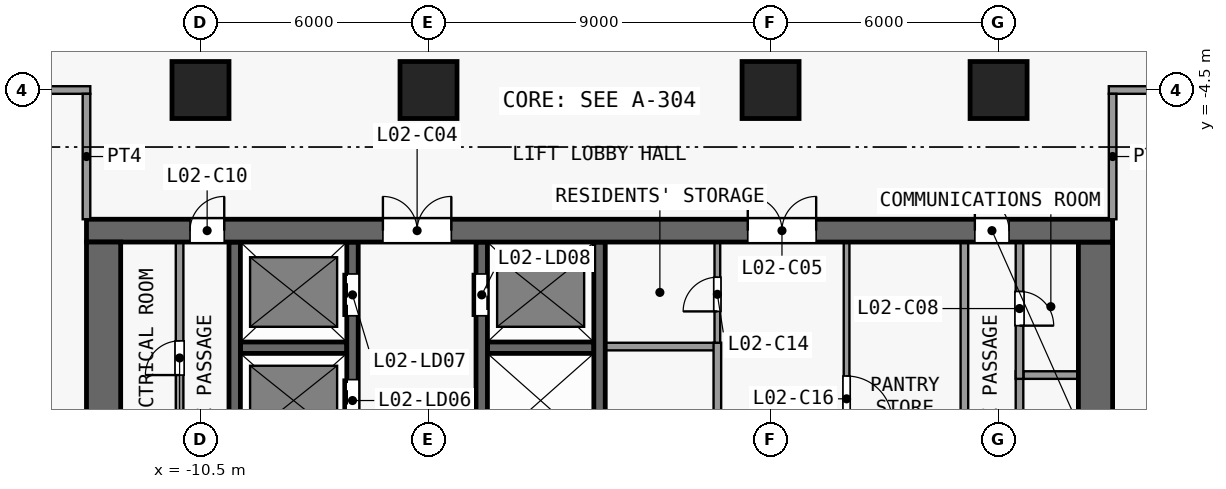
"""IFC4 building model, lengths in metres.
Left out: names, types, materials, properties, quantities, classifications, styles, units other than length and angle.
Written with IfcOpenShell. Run it as: python <this file> out.ifc"""

import sys

from ifc_helpers import new_model, si_unit, direction, frame, frame_2d, origin, origin_2d, place, context, subcontext, project, spatial, rectangle, extrude, element, fill, save


model = new_model("IFC4")
c1 = context("Model", 3, precision=1e-05, world=origin(), true_north=direction((0.0, 1.0)))
c2 = subcontext(c1, "Body", "Model", "MODEL_VIEW")
j1 = project(units=[si_unit("LENGTHUNIT", "METRE"), si_unit("PLANEANGLEUNIT", "RADIAN")], contexts=[c1])
p1 = place(None, origin())
s1 = spatial("IfcSite", under=j1, at=p1, CompositionType="ELEMENT")
p2 = place(p1, origin())
s2 = spatial("IfcBuilding", under=s1, at=p2, CompositionType="ELEMENT")
p3 = place(p2, frame((0.0, 0.0, 13.5)))
s3 = spatial("IfcBuildingStorey", under=s2, at=p3, CompositionType="ELEMENT", Elevation=13.5)
for number, where, z_axis, x_axis in (
    (1, (-10.5, -4.5, 0.0), (0.0, 0.0, 1.0), (1.0, 0.0, 0.0)),
    (2, (-4.5, -4.5, 0.0), (0.0, 0.0, 1.0), (1.0, 0.0, 0.0)),
    (3, (4.5, -4.5, 0.0), (0.0, 0.0, 1.0), (1.0, 0.0, 0.0)),
    (4, (10.5, -4.5, 0.0), (0.0, 0.0, 1.0), (1.0, 0.0, 0.0)),
):
    element("IfcColumn", number, at=place(p3, frame(where, z_axis=z_axis, x_axis=x_axis)), inside=s3, PredefinedType="COLUMN", context=c2, shape_type="SweptSolid", body=[
        extrude(rectangle(XDim=1.5, YDim=1.5, at=origin_2d()), origin(), (0.0, 0.0, 1.0), 5.0),
    ])
p4 = place(p3, frame((-13.5, -8.2, 0.0), z_axis=(0.0, 0.0, 1.0), x_axis=(1.0, 0.0, 0.0)))
e5 = element("IfcWall", 5, at=p4, inside=s3, PredefinedType="SHEAR", context=c2, shape_type="SweptSolid", body=[
    extrude(rectangle(XDim=27.0, YDim=0.6, at=frame_2d((13.5, 0.0))), origin(), (0.0, 0.0, 1.0), 4.65),
])
p5 = place(p4, frame((7.8, 0.0, 0.0)))
e6 = element("IfcOpeningElement", 6, at=p5, cuts=e5, PredefinedType="OPENING", context=c2, shape_type="SweptSolid", body=[
    extrude(rectangle(XDim=1.8, YDim=2.1, at=frame_2d((0.9, 1.05))), frame((0.0, 0.31, 0.0), z_axis=(0.0, -1.0, 0.0), x_axis=(1.0, 0.0, 0.0)), (0.0, 0.0, 1.0), 0.62),
])
p6 = place(p4, frame((17.4, 0.0, 0.0)))
e7 = element("IfcOpeningElement", 7, at=p6, cuts=e5, PredefinedType="OPENING", context=c2, shape_type="SweptSolid", body=[
    extrude(rectangle(XDim=1.8, YDim=2.1, at=frame_2d((0.9, 1.05))), frame((0.0, 0.31, 0.0), z_axis=(0.0, -1.0, 0.0), x_axis=(1.0, 0.0, 0.0)), (0.0, 0.0, 1.0), 0.62),
])
p7 = place(p4, frame((2.725, 0.0, 0.0)))
e8 = element("IfcOpeningElement", 8, at=p7, cuts=e5, PredefinedType="OPENING", context=c2, shape_type="SweptSolid", body=[
    extrude(rectangle(XDim=0.9, YDim=2.1, at=frame_2d((0.45, 1.05))), frame((0.0, 0.31, 0.0), z_axis=(0.0, -1.0, 0.0), x_axis=(1.0, 0.0, 0.0)), (0.0, 0.0, 1.0), 0.62),
])
p8 = place(p4, frame((23.375, 0.0, 0.0)))
e9 = element("IfcOpeningElement", 9, at=p8, cuts=e5, PredefinedType="OPENING", context=c2, shape_type="SweptSolid", body=[
    extrude(rectangle(XDim=0.9, YDim=2.1, at=frame_2d((0.45, 1.05))), frame((0.0, 0.31, 0.0), z_axis=(0.0, -1.0, 0.0), x_axis=(1.0, 0.0, 0.0)), (0.0, 0.0, 1.0), 0.62),
])
p9 = place(p3, frame((-13.05, -8.5, 0.0), z_axis=(0.0, 0.0, 1.0), x_axis=(0.0, -1.0, 0.0)))
e10 = element("IfcWall", 10, at=p9, inside=s3, PredefinedType="SHEAR", context=c2, shape_type="SweptSolid", body=[
    extrude(rectangle(XDim=16.1, YDim=0.9, at=frame_2d((8.05, 0.0))), origin(), (0.0, 0.0, 1.0), 4.65),
])
p10 = place(p9, frame((14.8, 0.0, 0.0)))
e11 = element("IfcOpeningElement", 11, at=p10, cuts=e10, PredefinedType="OPENING", context=c2, shape_type="SweptSolid", body=[
    extrude(rectangle(XDim=1.1, YDim=2.1, at=frame_2d((0.55, 1.05))), frame((0.0, 0.46, 0.0), z_axis=(0.0, -1.0, 0.0), x_axis=(1.0, 0.0, 0.0)), (0.0, 0.0, 1.0), 0.92),
])
p11 = place(p3, frame((13.05, -24.6, 0.0), z_axis=(0.0, 0.0, 1.0), x_axis=(0.0, 1.0, 0.0)))
e12 = element("IfcWall", 12, at=p11, inside=s3, PredefinedType="SHEAR", context=c2, shape_type="SweptSolid", body=[
    extrude(rectangle(XDim=16.1, YDim=0.9, at=frame_2d((8.05, 0.0))), origin(), (0.0, 0.0, 1.0), 4.65),
])
p12 = place(p11, frame((0.2, 0.0, 0.0)))
e13 = element("IfcOpeningElement", 13, at=p12, cuts=e12, PredefinedType="OPENING", context=c2, shape_type="SweptSolid", body=[
    extrude(rectangle(XDim=1.1, YDim=2.1, at=frame_2d((0.55, 1.05))), frame((0.0, 0.46, 0.0), z_axis=(0.0, -1.0, 0.0), x_axis=(1.0, 0.0, 0.0)), (0.0, 0.0, 1.0), 0.92),
])
p13 = place(p3, frame((11.15, -12.0, 0.0), z_axis=(0.0, 0.0, 1.0), x_axis=(1.0, 0.0, 0.0)))
e14 = element("IfcWall", 14, at=p13, inside=s3, PredefinedType="PARTITIONING", context=c2, shape_type="SweptSolid", body=[
    extrude(rectangle(XDim=1.45, YDim=0.2, at=frame_2d((0.725, 0.0))), origin(), (0.0, 0.0, 1.0), 4.65),
])
for number, where, z_axis, x_axis in (
    (15, (-9.45, -11.28, 0.0), (0.0, 0.0, 1.0), (1.0, 0.0, 0.0)),
    (16, (-2.95, -11.28, 0.0), (0.0, 0.0, 1.0), (1.0, 0.0, 0.0)),
):
    element("IfcWall", number, at=place(p3, frame(where, z_axis=z_axis, x_axis=x_axis)), inside=s3, PredefinedType="SHEAR", context=c2, shape_type="SweptSolid", body=[
        extrude(rectangle(XDim=2.8, YDim=0.3, at=frame_2d((1.4, 0.0))), origin(), (0.0, 0.0, 1.0), 4.65),
    ])
p14 = place(p3, frame((0.15, -11.25, 0.0), z_axis=(0.0, 0.0, 1.0), x_axis=(1.0, 0.0, 0.0)))
e17 = element("IfcWall", 17, at=p14, inside=s3, PredefinedType="PARTITIONING", context=c2, shape_type="SweptSolid", body=[
    extrude(rectangle(XDim=3.025, YDim=0.2, at=frame_2d((1.513, 0.0))), origin(), (0.0, 0.0, 1.0), 4.65),
])
p15 = place(p3, frame((-11.05, -14.7, 0.0), z_axis=(0.0, 0.0, 1.0), x_axis=(0.0, 1.0, 0.0)))
e18 = element("IfcWall", 18, at=p15, inside=s3, PredefinedType="PARTITIONING", context=c2, shape_type="SweptSolid", body=[
    extrude(rectangle(XDim=6.2, YDim=0.2, at=frame_2d((3.1, 0.0))), origin(), (0.0, 0.0, 1.0), 4.65),
])
p16 = place(p15, frame((2.7, 0.0, 0.0)))
e19 = element("IfcOpeningElement", 19, at=p16, cuts=e18, PredefinedType="OPENING", context=c2, shape_type="SweptSolid", body=[
    extrude(rectangle(XDim=0.9, YDim=2.1, at=frame_2d((0.45, 1.05))), frame((0.0, 0.11, 0.0), z_axis=(0.0, -1.0, 0.0), x_axis=(1.0, 0.0, 0.0)), (0.0, 0.0, 1.0), 0.22),
])
p17 = place(p3, frame((-9.6, -17.2, 0.0), z_axis=(0.0, 0.0, 1.0), x_axis=(0.0, 1.0, 0.0)))
e20 = element("IfcWall", 20, at=p17, inside=s3, PredefinedType="SHEAR", context=c2, shape_type="SweptSolid", body=[
    extrude(rectangle(XDim=8.7, YDim=0.3, at=frame_2d((4.35, 0.0))), origin(), (0.0, 0.0, 1.0), 4.65),
])
p18 = place(p3, frame((-6.5, -22.5, 0.0), z_axis=(0.0, 0.0, 1.0), x_axis=(0.0, 1.0, 0.0)))
e21 = element("IfcWall", 21, at=p18, inside=s3, PredefinedType="SHEAR", context=c2, shape_type="SweptSolid", body=[
    extrude(rectangle(XDim=14.0, YDim=0.3, at=frame_2d((7.0, 0.0))), origin(), (0.0, 0.0, 1.0), 4.65),
])
p19 = place(p18, frame((0.94, 0.0, 0.0)))
e22 = element("IfcOpeningElement", 22, at=p19, cuts=e21, PredefinedType="OPENING", context=c2, shape_type="SweptSolid", body=[
    extrude(rectangle(XDim=1.1, YDim=2.1, at=frame_2d((0.55, 1.05))), frame((0.0, 0.16, 0.0), z_axis=(0.0, -1.0, 0.0), x_axis=(1.0, 0.0, 0.0)), (0.0, 0.0, 1.0), 0.32),
])
p20 = place(p18, frame((3.72, 0.0, 0.0)))
e23 = element("IfcOpeningElement", 23, at=p20, cuts=e21, PredefinedType="OPENING", context=c2, shape_type="SweptSolid", body=[
    extrude(rectangle(XDim=1.1, YDim=2.1, at=frame_2d((0.55, 1.05))), frame((0.0, 0.16, 0.0), z_axis=(0.0, -1.0, 0.0), x_axis=(1.0, 0.0, 0.0)), (0.0, 0.0, 1.0), 0.32),
])
p21 = place(p18, frame((6.5, 0.0, 0.0)))
e24 = element("IfcOpeningElement", 24, at=p21, cuts=e21, PredefinedType="OPENING", context=c2, shape_type="SweptSolid", body=[
    extrude(rectangle(XDim=1.1, YDim=2.1, at=frame_2d((0.55, 1.05))), frame((0.0, 0.16, 0.0), z_axis=(0.0, -1.0, 0.0), x_axis=(1.0, 0.0, 0.0)), (0.0, 0.0, 1.0), 0.32),
])
p22 = place(p18, frame((9.28, 0.0, 0.0)))
e25 = element("IfcOpeningElement", 25, at=p22, cuts=e21, PredefinedType="OPENING", context=c2, shape_type="SweptSolid", body=[
    extrude(rectangle(XDim=1.1, YDim=2.1, at=frame_2d((0.55, 1.05))), frame((0.0, 0.16, 0.0), z_axis=(0.0, -1.0, 0.0), x_axis=(1.0, 0.0, 0.0)), (0.0, 0.0, 1.0), 0.32),
])
p23 = place(p18, frame((12.06, 0.0, 0.0)))
e26 = element("IfcOpeningElement", 26, at=p23, cuts=e21, PredefinedType="OPENING", context=c2, shape_type="SweptSolid", body=[
    extrude(rectangle(XDim=1.1, YDim=2.1, at=frame_2d((0.55, 1.05))), frame((0.0, 0.16, 0.0), z_axis=(0.0, -1.0, 0.0), x_axis=(1.0, 0.0, 0.0)), (0.0, 0.0, 1.0), 0.32),
])
p24 = place(p3, frame((-3.1, -22.55, 0.0), z_axis=(0.0, 0.0, 1.0), x_axis=(0.0, 1.0, 0.0)))
e27 = element("IfcWall", 27, at=p24, inside=s3, PredefinedType="SHEAR", context=c2, shape_type="SweptSolid", body=[
    extrude(rectangle(XDim=14.05, YDim=0.3, at=frame_2d((7.025, 0.0))), origin(), (0.0, 0.0, 1.0), 4.65),
])
p25 = place(p24, frame((12.11, 0.0, 0.0)))
e28 = element("IfcOpeningElement", 28, at=p25, cuts=e27, PredefinedType="OPENING", context=c2, shape_type="SweptSolid", body=[
    extrude(rectangle(XDim=1.1, YDim=2.1, at=frame_2d((0.55, 1.05))), frame((0.0, 0.16, 0.0), z_axis=(0.0, -1.0, 0.0), x_axis=(1.0, 0.0, 0.0)), (0.0, 0.0, 1.0), 0.32),
])
p26 = place(p24, frame((0.84, 0.0, 0.0)))
e29 = element("IfcOpeningElement", 29, at=p26, cuts=e27, PredefinedType="OPENING", context=c2, shape_type="SweptSolid", body=[
    extrude(rectangle(XDim=1.4, YDim=2.1, at=frame_2d((0.7, 1.05))), frame((0.0, 0.16, 0.0), z_axis=(0.0, -1.0, 0.0), x_axis=(1.0, 0.0, 0.0)), (0.0, 0.0, 1.0), 0.32),
])
p27 = place(p3, frame((0.0, -22.25, 0.0), z_axis=(0.0, 0.0, 1.0), x_axis=(0.0, 1.0, 0.0)))
e30 = element("IfcWall", 30, at=p27, inside=s3, PredefinedType="SHEAR", context=c2, shape_type="SweptSolid", body=[
    extrude(rectangle(XDim=13.75, YDim=0.3, at=frame_2d((6.875, 0.0))), origin(), (0.0, 0.0, 1.0), 4.65),
])
p28 = place(p3, frame((3.1, -19.6, 0.0), z_axis=(0.0, 0.0, 1.0), x_axis=(0.0, 1.0, 0.0)))
e31 = element("IfcWall", 31, at=p28, inside=s3, PredefinedType="PARTITIONING", context=c2, shape_type="SweptSolid", body=[
    extrude(rectangle(XDim=8.45, YDim=0.2, at=frame_2d((4.225, 0.0))), origin(), (0.0, 0.0, 1.0), 4.65),
])
p29 = place(p28, frame((3.625, 0.0, 0.0)))
e32 = element("IfcOpeningElement", 32, at=p29, cuts=e31, PredefinedType="OPENING", context=c2, shape_type="SweptSolid", body=[
    extrude(rectangle(XDim=1.2, YDim=2.1, at=frame_2d((0.6, 1.05))), frame((0.0, 0.11, 0.0), z_axis=(0.0, -1.0, 0.0), x_axis=(1.0, 0.0, 0.0)), (0.0, 0.0, 1.0), 0.22),
])
p30 = place(p3, frame((3.1, -11.15, 0.0), z_axis=(0.0, 0.0, 1.0), x_axis=(0.0, 1.0, 0.0)))
e33 = element("IfcWall", 33, at=p30, inside=s3, PredefinedType="PARTITIONING", context=c2, shape_type="SweptSolid", body=[
    extrude(rectangle(XDim=2.65, YDim=0.15, at=frame_2d((1.325, 0.0))), origin(), (0.0, 0.0, 1.0), 4.65),
])
p31 = place(p30, frame((0.825, 0.0, 0.0)))
e34 = element("IfcOpeningElement", 34, at=p31, cuts=e33, PredefinedType="OPENING", context=c2, shape_type="SweptSolid", body=[
    extrude(rectangle(XDim=0.9, YDim=2.1, at=frame_2d((0.45, 1.05))), frame((0.0, 0.085, 0.0), z_axis=(0.0, -1.0, 0.0), x_axis=(1.0, 0.0, 0.0)), (0.0, 0.0, 1.0), 0.17),
])
p32 = place(p3, frame((6.5, -8.5, 0.0), z_axis=(0.0, 0.0, 1.0), x_axis=(0.0, -1.0, 0.0)))
e35 = element("IfcWall", 35, at=p32, inside=s3, PredefinedType="PARTITIONING", context=c2, shape_type="SweptSolid", body=[
    extrude(rectangle(XDim=10.85, YDim=0.15, at=frame_2d((5.425, 0.0))), origin(), (0.0, 0.0, 1.0), 4.65),
])
p33 = place(p32, frame((9.175, 0.0, 0.0)))
e36 = element("IfcOpeningElement", 36, at=p33, cuts=e35, PredefinedType="OPENING", context=c2, shape_type="SweptSolid", body=[
    extrude(rectangle(XDim=0.9, YDim=2.1, at=frame_2d((0.45, 1.05))), frame((0.0, 0.085, 0.0), z_axis=(0.0, -1.0, 0.0), x_axis=(1.0, 0.0, 0.0)), (0.0, 0.0, 1.0), 0.17),
])
p34 = place(p32, frame((3.525, 0.0, 0.0)))
e37 = element("IfcOpeningElement", 37, at=p34, cuts=e35, PredefinedType="OPENING", context=c2, shape_type="SweptSolid", body=[
    extrude(rectangle(XDim=1.2, YDim=2.1, at=frame_2d((0.6, 1.05))), frame((0.0, 0.085, 0.0), z_axis=(0.0, -1.0, 0.0), x_axis=(1.0, 0.0, 0.0)), (0.0, 0.0, 1.0), 0.17),
])
p35 = place(p3, frame((9.6, -16.9, 0.0), z_axis=(0.0, 0.0, 1.0), x_axis=(0.0, 1.0, 0.0)))
e38 = element("IfcWall", 38, at=p35, inside=s3, PredefinedType="PARTITIONING", context=c2, shape_type="SweptSolid", body=[
    extrude(rectangle(XDim=8.4, YDim=0.2, at=frame_2d((4.2, 0.0))), origin(), (0.0, 0.0, 1.0), 4.65),
])
p36 = place(p3, frame((11.05, -11.9, 0.0), z_axis=(0.0, 0.0, 1.0), x_axis=(0.0, -1.0, 0.0)))
e39 = element("IfcWall", 39, at=p36, inside=s3, PredefinedType="PARTITIONING", context=c2, shape_type="SweptSolid", body=[
    extrude(rectangle(XDim=5.0, YDim=0.2, at=frame_2d((2.5, 0.0))), origin(), (0.0, 0.0, 1.0), 4.65),
])
p37 = place(p36, frame((2.175, 0.0, 0.0)))
e40 = element("IfcOpeningElement", 40, at=p37, cuts=e39, PredefinedType="OPENING", context=c2, shape_type="SweptSolid", body=[
    extrude(rectangle(XDim=0.9, YDim=2.1, at=frame_2d((0.45, 1.05))), frame((0.0, 0.11, 0.0), z_axis=(0.0, -1.0, 0.0), x_axis=(1.0, 0.0, 0.0)), (0.0, 0.0, 1.0), 0.22),
])
p38 = place(p3, frame((11.05, -8.5, 0.0), z_axis=(0.0, 0.0, 1.0), x_axis=(0.0, -1.0, 0.0)))
e41 = element("IfcWall", 41, at=p38, inside=s3, PredefinedType="PARTITIONING", context=c2, shape_type="SweptSolid", body=[
    extrude(rectangle(XDim=3.6, YDim=0.2, at=frame_2d((1.8, 0.0))), origin(), (0.0, 0.0, 1.0), 4.65),
])
p39 = place(p38, frame((1.3, 0.0, 0.0)))
e42 = element("IfcOpeningElement", 42, at=p39, cuts=e41, PredefinedType="OPENING", context=c2, shape_type="SweptSolid", body=[
    extrude(rectangle(XDim=0.9, YDim=2.1, at=frame_2d((0.45, 1.05))), frame((0.0, 0.11, 0.0), z_axis=(0.0, -1.0, 0.0), x_axis=(1.0, 0.0, 0.0)), (0.0, 0.0, 1.0), 0.22),
])
p40 = place(p3, frame((-31.6, -4.5, 0.0), z_axis=(0.0, 0.0, 1.0), x_axis=(1.0, 0.0, 0.0)))
e43 = element("IfcWall", 43, at=p40, inside=s3, PredefinedType="PARTITIONING", context=c2, shape_type="SweptSolid", body=[
    extrude(rectangle(XDim=18.2, YDim=0.2, at=frame_2d((9.1, 0.0))), origin(), (0.0, 0.0, 1.0), 4.65),
])
p41 = place(p40, frame((3.2, 0.0, 0.0)))
e44 = element("IfcOpeningElement", 44, at=p41, cuts=e43, PredefinedType="OPENING", context=c2, shape_type="SweptSolid", body=[
    extrude(rectangle(XDim=1.0, YDim=2.1, at=frame_2d((0.5, 1.05))), frame((0.0, 0.11, 0.0), z_axis=(0.0, -1.0, 0.0), x_axis=(1.0, 0.0, 0.0)), (0.0, 0.0, 1.0), 0.22),
])
p42 = place(p40, frame((13.2, 0.0, 0.0)))
e45 = element("IfcOpeningElement", 45, at=p42, cuts=e43, PredefinedType="OPENING", context=c2, shape_type="SweptSolid", body=[
    extrude(rectangle(XDim=1.0, YDim=2.1, at=frame_2d((0.5, 1.05))), frame((0.0, 0.11, 0.0), z_axis=(0.0, -1.0, 0.0), x_axis=(1.0, 0.0, 0.0)), (0.0, 0.0, 1.0), 0.22),
])
p43 = place(p3, frame((13.4, -4.5, 0.0), z_axis=(0.0, 0.0, 1.0), x_axis=(1.0, 0.0, 0.0)))
e46 = element("IfcWall", 46, at=p43, inside=s3, PredefinedType="PARTITIONING", context=c2, shape_type="SweptSolid", body=[
    extrude(rectangle(XDim=15.2, YDim=0.2, at=frame_2d((7.6, 0.0))), origin(), (0.0, 0.0, 1.0), 4.65),
])
p44 = place(p43, frame((7.1, 0.0, 0.0)))
e47 = element("IfcOpeningElement", 47, at=p44, cuts=e46, PredefinedType="OPENING", context=c2, shape_type="SweptSolid", body=[
    extrude(rectangle(XDim=1.0, YDim=2.1, at=frame_2d((0.5, 1.05))), frame((0.0, 0.11, 0.0), z_axis=(0.0, -1.0, 0.0), x_axis=(1.0, 0.0, 0.0)), (0.0, 0.0, 1.0), 0.22),
])
for number, where, z_axis, x_axis in (
    (48, (-13.5, -7.9, 0.0), (0.0, 0.0, 1.0), (0.0, 1.0, 0.0)),
    (49, (13.5, -7.9, 0.0), (0.0, 0.0, 1.0), (0.0, 1.0, 0.0)),
):
    element("IfcWall", number, at=place(p3, frame(where, z_axis=z_axis, x_axis=x_axis)), inside=s3, PredefinedType="PARTITIONING", context=c2, shape_type="SweptSolid", body=[
        extrude(rectangle(XDim=3.3, YDim=0.2, at=frame_2d((1.65, 0.0))), origin(), (0.0, 0.0, 1.0), 4.65),
    ])
p45 = place(p22, origin())
e50 = element("IfcDoor", 50, at=p45, inside=s3, OperationType="DOUBLE_DOOR_SLIDING", PredefinedType="DOOR", context=c2, shape_type="SweptSolid", body=[
    extrude(rectangle(XDim=1.1, YDim=2.1, at=frame_2d((0.55, 1.05))), frame((0.0, 0.025, 0.0), z_axis=(0.0, -1.0, 0.0), x_axis=(1.0, 0.0, 0.0)), (0.0, 0.0, 1.0), 0.05),
])
fill(e25, e50)
p46 = place(p23, origin())
e51 = element("IfcDoor", 51, at=p46, inside=s3, OperationType="DOUBLE_DOOR_SLIDING", PredefinedType="DOOR", context=c2, shape_type="SweptSolid", body=[
    extrude(rectangle(XDim=1.1, YDim=2.1, at=frame_2d((0.55, 1.05))), frame((0.0, 0.025, 0.0), z_axis=(0.0, -1.0, 0.0), x_axis=(1.0, 0.0, 0.0)), (0.0, 0.0, 1.0), 0.05),
])
fill(e26, e51)
p47 = place(p25, origin())
e52 = element("IfcDoor", 52, at=p47, inside=s3, OperationType="DOUBLE_DOOR_SLIDING", PredefinedType="DOOR", context=c2, shape_type="SweptSolid", body=[
    extrude(rectangle(XDim=1.1, YDim=2.1, at=frame_2d((0.55, 1.05))), frame((0.0, 0.025, 0.0), z_axis=(0.0, -1.0, 0.0), x_axis=(1.0, 0.0, 0.0)), (0.0, 0.0, 1.0), 0.05),
])
fill(e28, e52)
p48 = place(p5, origin())
e53 = element("IfcDoor", 53, at=p48, inside=s3, OperationType="DOUBLE_DOOR_SINGLE_SWING", PredefinedType="DOOR", context=c2, shape_type="SweptSolid", body=[
    extrude(rectangle(XDim=1.8, YDim=2.1, at=frame_2d((0.9, 1.05))), frame((0.0, 0.025, 0.0), z_axis=(0.0, -1.0, 0.0), x_axis=(1.0, 0.0, 0.0)), (0.0, 0.0, 1.0), 0.05),
])
fill(e6, e53)
p49 = place(p6, origin())
e54 = element("IfcDoor", 54, at=p49, inside=s3, OperationType="DOUBLE_DOOR_SINGLE_SWING", PredefinedType="DOOR", context=c2, shape_type="SweptSolid", body=[
    extrude(rectangle(XDim=1.8, YDim=2.1, at=frame_2d((0.9, 1.05))), frame((0.0, 0.025, 0.0), z_axis=(0.0, -1.0, 0.0), x_axis=(1.0, 0.0, 0.0)), (0.0, 0.0, 1.0), 0.05),
])
fill(e7, e54)
p50 = place(p16, origin())
e55 = element("IfcDoor", 55, at=p50, inside=s3, OperationType="SINGLE_SWING_LEFT", PredefinedType="DOOR", context=c2, shape_type="SweptSolid", body=[
    extrude(rectangle(XDim=0.9, YDim=2.1, at=frame_2d((0.45, 1.05))), frame((0.0, 0.025, 0.0), z_axis=(0.0, -1.0, 0.0), x_axis=(1.0, 0.0, 0.0)), (0.0, 0.0, 1.0), 0.05),
])
fill(e19, e55)
p51 = place(p39, origin())
e56 = element("IfcDoor", 56, at=p51, inside=s3, OperationType="SINGLE_SWING_RIGHT", PredefinedType="DOOR", context=c2, shape_type="SweptSolid", body=[
    extrude(rectangle(XDim=0.9, YDim=2.1, at=frame_2d((0.45, 1.05))), frame((0.0, 0.025, 0.0), z_axis=(0.0, -1.0, 0.0), x_axis=(1.0, 0.0, 0.0)), (0.0, 0.0, 1.0), 0.05),
])
fill(e42, e56)
p52 = place(p7, origin())
e57 = element("IfcDoor", 57, at=p52, inside=s3, OperationType="SINGLE_SWING_RIGHT", PredefinedType="DOOR", context=c2, shape_type="SweptSolid", body=[
    extrude(rectangle(XDim=0.9, YDim=2.1, at=frame_2d((0.45, 1.05))), frame((0.0, 0.025, 0.0), z_axis=(0.0, -1.0, 0.0), x_axis=(1.0, 0.0, 0.0)), (0.0, 0.0, 1.0), 0.05),
])
fill(e8, e57)
p53 = place(p8, origin())
e58 = element("IfcDoor", 58, at=p53, inside=s3, OperationType="SINGLE_SWING_LEFT", PredefinedType="DOOR", context=c2, shape_type="SweptSolid", body=[
    extrude(rectangle(XDim=0.9, YDim=2.1, at=frame_2d((0.45, 1.05))), frame((0.0, 0.025, 0.0), z_axis=(0.0, -1.0, 0.0), x_axis=(1.0, 0.0, 0.0)), (0.0, 0.0, 1.0), 0.05),
])
fill(e9, e58)
p54 = place(p31, origin())
e59 = element("IfcDoor", 59, at=p54, inside=s3, OperationType="SINGLE_SWING_LEFT", PredefinedType="DOOR", context=c2, shape_type="SweptSolid", body=[
    extrude(rectangle(XDim=0.9, YDim=2.1, at=frame_2d((0.45, 1.05))), frame((0.0, 0.025, 0.0), z_axis=(0.0, -1.0, 0.0), x_axis=(1.0, 0.0, 0.0)), (0.0, 0.0, 1.0), 0.05),
])
fill(e34, e59)
p55 = place(p34, origin())
e60 = element("IfcDoor", 60, at=p55, inside=s3, OperationType="SINGLE_SWING_RIGHT", PredefinedType="DOOR", context=c2, shape_type="SweptSolid", body=[
    extrude(rectangle(XDim=1.2, YDim=2.1, at=frame_2d((0.6, 1.05))), frame((0.0, 0.025, 0.0), z_axis=(0.0, -1.0, 0.0), x_axis=(1.0, 0.0, 0.0)), (0.0, 0.0, 1.0), 0.05),
])
fill(e37, e60)
save(model, sys.argv[1])
